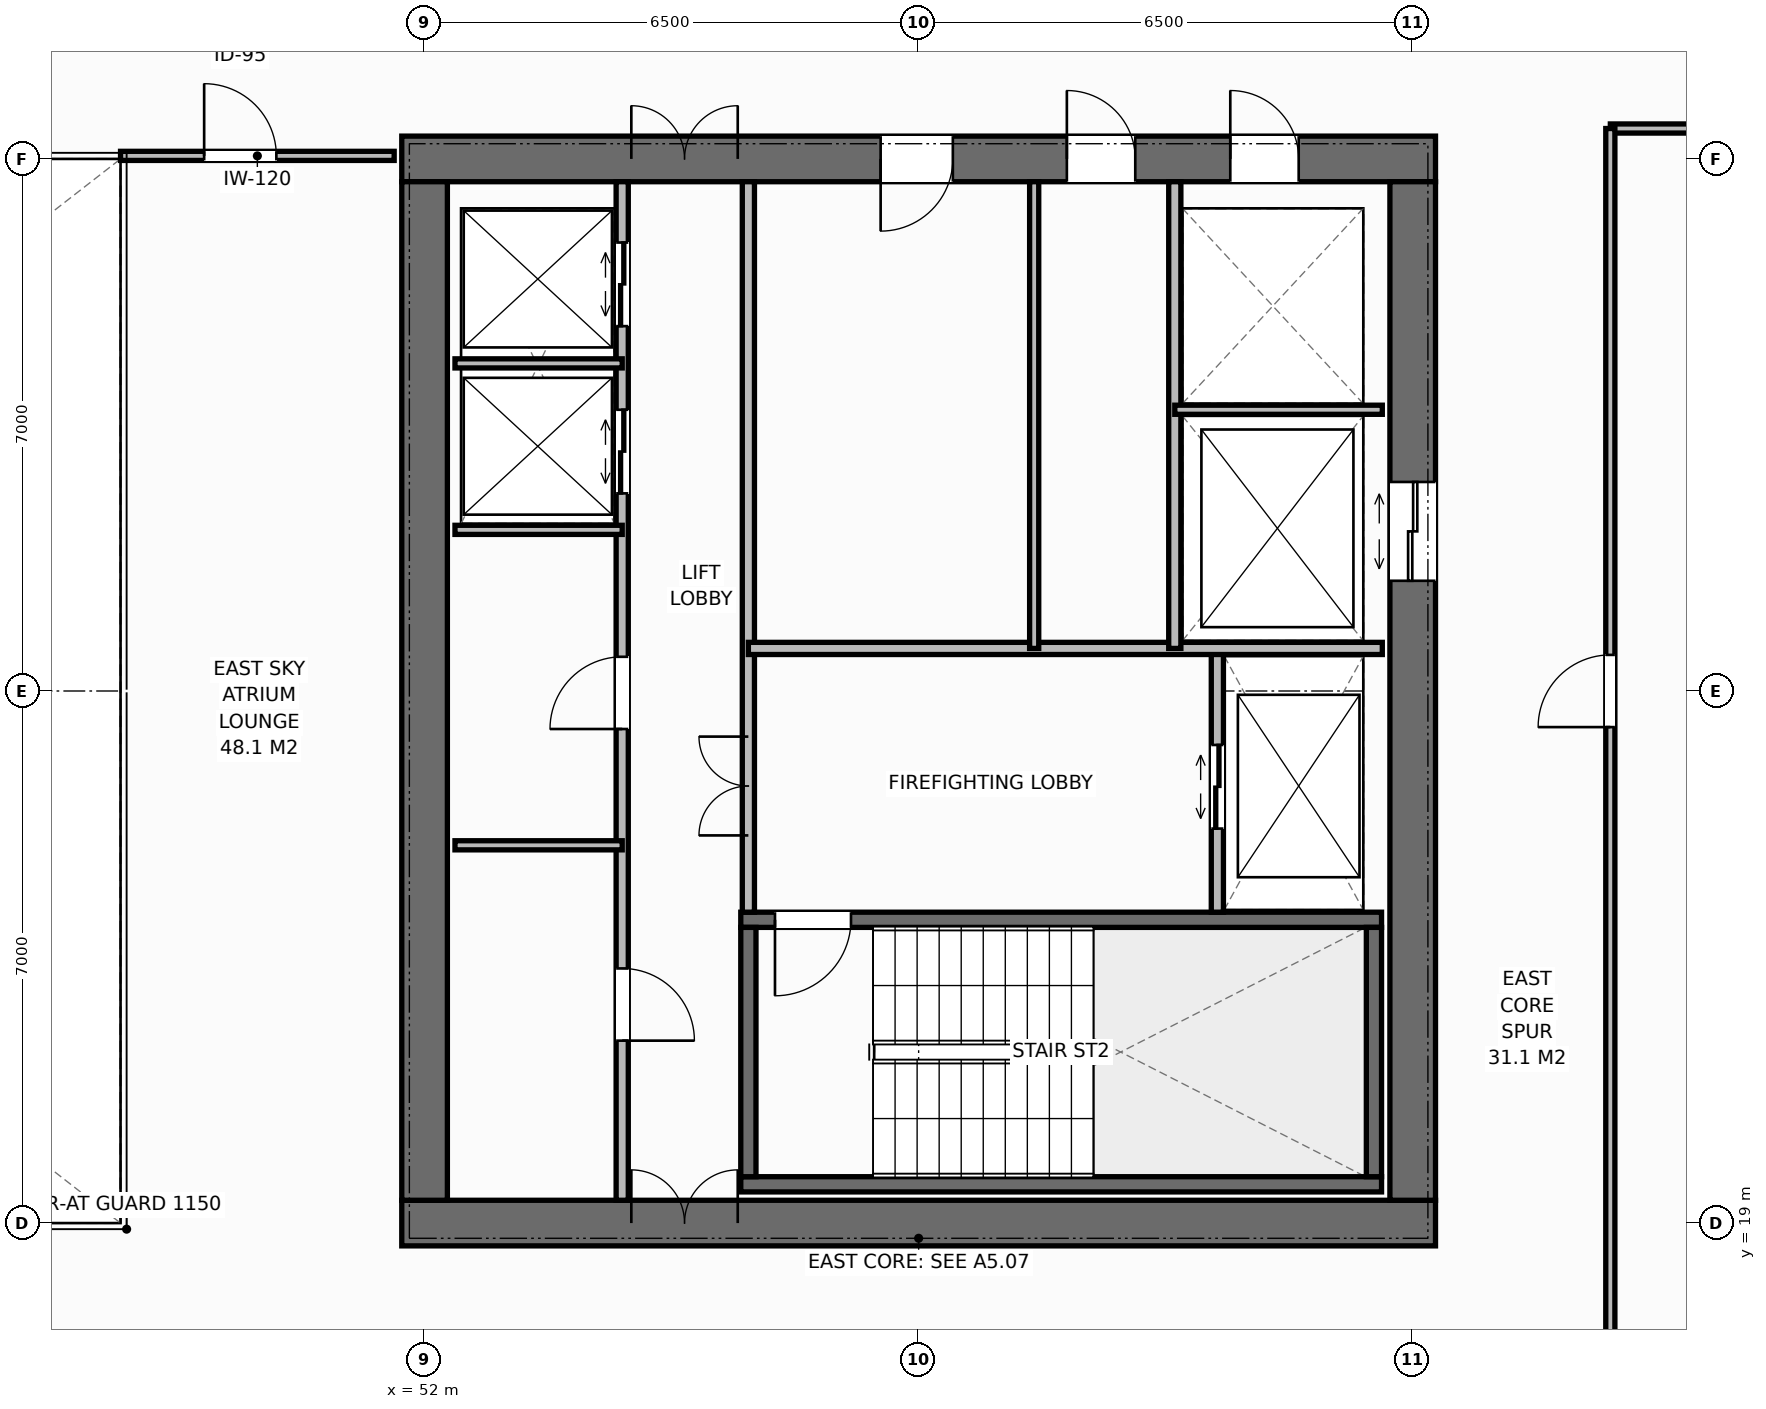
"""IFC4 building model, lengths in metres.
Left out: names, types, materials, properties, quantities, classifications, styles, units other than length and angle.
Written with IfcOpenShell. Run it as: python <this file> out.ifc"""

import sys

from ifc_helpers import new_model, si_unit, direction, frame, frame_2d, origin, place, context, subcontext, project, spatial, rectangle, extrude, element, fill, save


model = new_model("IFC4")
c1 = context("Model", 3, precision=1e-05, world=origin(), true_north=direction((0.0, 1.0)))
c2 = subcontext(c1, "Body", "Model", "MODEL_VIEW")
j1 = project(units=[si_unit("LENGTHUNIT", "METRE"), si_unit("PLANEANGLEUNIT", "RADIAN")], contexts=[c1])
p1 = place(None, origin())
s1 = spatial("IfcSite", under=j1, at=p1, CompositionType="ELEMENT")
p2 = place(p1, origin())
s2 = spatial("IfcBuilding", under=s1, at=p2, CompositionType="ELEMENT")
p3 = place(p2, frame((0.0, 0.0, 189.8)))
s3 = spatial("IfcBuildingStorey", under=s2, at=p3, CompositionType="ELEMENT", Elevation=189.8)
p4 = place(p3, frame((51.7, 19.0, 0.0), z_axis=(0.0, 0.0, 1.0), x_axis=(1.0, 0.0, 0.0)))
e1 = element("IfcWall", 1, at=p4, inside=s3, PredefinedType="SHEAR", context=c2, shape_type="SweptSolid", body=[
    extrude(rectangle(XDim=13.6, YDim=0.6, at=frame_2d((6.8, 0.0))), origin(), (0.0, 0.0, 1.0), 3.8),
])
p5 = place(p4, frame((3.02, 0.0, 0.0)))
e2 = element("IfcOpeningElement", 2, at=p5, cuts=e1, PredefinedType="OPENING", context=c2, shape_type="SweptSolid", body=[
    extrude(rectangle(XDim=1.4, YDim=2.2, at=frame_2d((0.7, 1.1))), frame((0.0, 0.31, 0.0), z_axis=(0.0, -1.0, 0.0), x_axis=(1.0, 0.0, 0.0)), (0.0, 0.0, 1.0), 0.62),
])
p6 = place(p3, frame((51.7, 33.0, 0.0), z_axis=(0.0, 0.0, 1.0), x_axis=(1.0, 0.0, 0.0)))
e3 = element("IfcWall", 3, at=p6, inside=s3, PredefinedType="SHEAR", context=c2, shape_type="SweptSolid", body=[
    extrude(rectangle(XDim=13.6, YDim=0.6, at=frame_2d((6.8, 0.0))), origin(), (0.0, 0.0, 1.0), 3.8),
])
p7 = place(p6, frame((3.02, 0.0, 0.0)))
e4 = element("IfcOpeningElement", 4, at=p7, cuts=e3, PredefinedType="OPENING", context=c2, shape_type="SweptSolid", body=[
    extrude(rectangle(XDim=1.4, YDim=2.2, at=frame_2d((0.7, 1.1))), frame((0.0, 0.31, 0.0), z_axis=(0.0, -1.0, 0.0), x_axis=(1.0, 0.0, 0.0)), (0.0, 0.0, 1.0), 0.62),
])
p8 = place(p6, frame((10.9, 0.0, 0.0)))
e5 = element("IfcOpeningElement", 5, at=p8, cuts=e3, PredefinedType="OPENING", context=c2, shape_type="SweptSolid", body=[
    extrude(rectangle(XDim=0.9, YDim=2.15, at=frame_2d((0.45, 1.075))), frame((0.0, 0.31, 0.0), z_axis=(0.0, -1.0, 0.0), x_axis=(1.0, 0.0, 0.0)), (0.0, 0.0, 1.0), 0.62),
])
p9 = place(p6, frame((6.3, 0.0, 0.0)))
e6 = element("IfcOpeningElement", 6, at=p9, cuts=e3, PredefinedType="OPENING", context=c2, shape_type="SweptSolid", body=[
    extrude(rectangle(XDim=0.95, YDim=2.15, at=frame_2d((0.475, 1.075))), frame((0.0, 0.31, 0.0), z_axis=(0.0, -1.0, 0.0), x_axis=(1.0, 0.0, 0.0)), (0.0, 0.0, 1.0), 0.62),
])
p10 = place(p6, frame((8.75, 0.0, 0.0)))
e7 = element("IfcOpeningElement", 7, at=p10, cuts=e3, PredefinedType="OPENING", context=c2, shape_type="SweptSolid", body=[
    extrude(rectangle(XDim=0.9, YDim=2.15, at=frame_2d((0.45, 1.075))), frame((0.0, 0.31, 0.0), z_axis=(0.0, -1.0, 0.0), x_axis=(1.0, 0.0, 0.0)), (0.0, 0.0, 1.0), 0.62),
])
p11 = place(p3, frame((52.0, 19.3, 0.0), z_axis=(0.0, 0.0, 1.0), x_axis=(0.0, 1.0, 0.0)))
e8 = element("IfcWall", 8, at=p11, inside=s3, PredefinedType="SHEAR", context=c2, shape_type="SweptSolid", body=[
    extrude(rectangle(XDim=13.4, YDim=0.6, at=frame_2d((6.7, 0.0))), origin(), (0.0, 0.0, 1.0), 3.8),
])
p12 = place(p3, frame((65.0, 19.3, 0.0), z_axis=(0.0, 0.0, 1.0), x_axis=(0.0, 1.0, 0.0)))
e9 = element("IfcWall", 9, at=p12, inside=s3, PredefinedType="SHEAR", context=c2, shape_type="SweptSolid", body=[
    extrude(rectangle(XDim=13.4, YDim=0.6, at=frame_2d((6.7, 0.0))), origin(), (0.0, 0.0, 1.0), 3.8),
])
p13 = place(p12, frame((8.15, 0.0, 0.0)))
e10 = element("IfcOpeningElement", 10, at=p13, cuts=e9, PredefinedType="OPENING", context=c2, shape_type="SweptSolid", body=[
    extrude(rectangle(XDim=1.3, YDim=2.2, at=frame_2d((0.65, 1.1))), frame((0.0, 0.31, 0.0), z_axis=(0.0, -1.0, 0.0), x_axis=(1.0, 0.0, 0.0)), (0.0, 0.0, 1.0), 0.62),
])
p14 = place(p3, frame((56.16, 19.51, 0.0), z_axis=(0.0, 0.0, 1.0), x_axis=(1.0, 0.0, 0.0)))
e11 = element("IfcWall", 11, at=p14, inside=s3, PredefinedType="SHEAR", context=c2, shape_type="SweptSolid", body=[
    extrude(rectangle(XDim=8.43, YDim=0.2, at=frame_2d((4.215, 0.0))), origin(), (0.0, 0.0, 1.0), 3.8),
])
p15 = place(p3, frame((56.16, 22.99, 0.0), z_axis=(0.0, 0.0, 1.0), x_axis=(1.0, 0.0, 0.0)))
e12 = element("IfcWall", 12, at=p15, inside=s3, PredefinedType="SHEAR", context=c2, shape_type="SweptSolid", body=[
    extrude(rectangle(XDim=8.43, YDim=0.2, at=frame_2d((4.215, 0.0))), origin(), (0.0, 0.0, 1.0), 3.8),
])
p16 = place(p15, frame((0.45, 0.0, 0.0)))
e13 = element("IfcOpeningElement", 13, at=p16, cuts=e12, PredefinedType="OPENING", context=c2, shape_type="SweptSolid", body=[
    extrude(rectangle(XDim=1.0, YDim=2.15, at=frame_2d((0.5, 1.075))), frame((0.0, 0.11, 0.0), z_axis=(0.0, -1.0, 0.0), x_axis=(1.0, 0.0, 0.0)), (0.0, 0.0, 1.0), 0.22),
])
for number, where, z_axis, x_axis in (
    (14, (56.26, 19.61, 0.0), (0.0, 0.0, 1.0), (0.0, 1.0, 0.0)),
    (15, (64.49, 19.61, 0.0), (0.0, 0.0, 1.0), (0.0, 1.0, 0.0)),
):
    element("IfcWall", number, at=place(p3, frame(where, z_axis=z_axis, x_axis=x_axis)), inside=s3, PredefinedType="SHEAR", context=c2, shape_type="SweptSolid", body=[
        extrude(rectangle(XDim=3.28, YDim=0.2, at=frame_2d((1.64, 0.0))), origin(), (0.0, 0.0, 1.0), 3.8),
    ])
p17 = place(p3, frame((54.6, 19.3, 0.0), z_axis=(0.0, 0.0, 1.0), x_axis=(0.0, 1.0, 0.0)))
e16 = element("IfcWall", 16, at=p17, inside=s3, PredefinedType="STANDARD", context=c2, shape_type="SweptSolid", body=[
    extrude(rectangle(XDim=13.4, YDim=0.16, at=frame_2d((6.7, 0.0))), origin(), (0.0, 0.0, 1.0), 3.572),
])
p18 = place(p17, frame((2.1, 0.0, 0.0)))
e17 = element("IfcOpeningElement", 17, at=p18, cuts=e16, PredefinedType="OPENING", context=c2, shape_type="SweptSolid", body=[
    extrude(rectangle(XDim=0.95, YDim=2.15, at=frame_2d((0.475, 1.075))), frame((0.0, 0.09, 0.0), z_axis=(0.0, -1.0, 0.0), x_axis=(1.0, 0.0, 0.0)), (0.0, 0.0, 1.0), 0.18),
])
p19 = place(p17, frame((6.2, 0.0, 0.0)))
e18 = element("IfcOpeningElement", 18, at=p19, cuts=e16, PredefinedType="OPENING", context=c2, shape_type="SweptSolid", body=[
    extrude(rectangle(XDim=0.95, YDim=2.15, at=frame_2d((0.475, 1.075))), frame((0.0, 0.09, 0.0), z_axis=(0.0, -1.0, 0.0), x_axis=(1.0, 0.0, 0.0)), (0.0, 0.0, 1.0), 0.18),
])
p20 = place(p17, frame((9.3, 0.0, 0.0)))
e19 = element("IfcOpeningElement", 19, at=p20, cuts=e16, PredefinedType="OPENING", context=c2, shape_type="SweptSolid", body=[
    extrude(rectangle(XDim=1.1, YDim=2.2, at=frame_2d((0.55, 1.1))), frame((0.0, 0.09, 0.0), z_axis=(0.0, -1.0, 0.0), x_axis=(1.0, 0.0, 0.0)), (0.0, 0.0, 1.0), 0.18),
])
p21 = place(p17, frame((11.5, 0.0, 0.0)))
e20 = element("IfcOpeningElement", 20, at=p21, cuts=e16, PredefinedType="OPENING", context=c2, shape_type="SweptSolid", body=[
    extrude(rectangle(XDim=1.1, YDim=2.2, at=frame_2d((0.55, 1.1))), frame((0.0, 0.09, 0.0), z_axis=(0.0, -1.0, 0.0), x_axis=(1.0, 0.0, 0.0)), (0.0, 0.0, 1.0), 0.18),
])
p22 = place(p3, frame((56.26, 23.09, 0.0), z_axis=(0.0, 0.0, 1.0), x_axis=(0.0, 1.0, 0.0)))
e21 = element("IfcWall", 21, at=p22, inside=s3, PredefinedType="STANDARD", context=c2, shape_type="SweptSolid", body=[
    extrude(rectangle(XDim=9.61, YDim=0.16, at=frame_2d((4.805, 0.0))), origin(), (0.0, 0.0, 1.0), 3.572),
])
p23 = place(p22, frame((1.01, 0.0, 0.0)))
e22 = element("IfcOpeningElement", 22, at=p23, cuts=e21, PredefinedType="OPENING", context=c2, shape_type="SweptSolid", body=[
    extrude(rectangle(XDim=1.3, YDim=2.2, at=frame_2d((0.65, 1.1))), frame((0.0, 0.09, 0.0), z_axis=(0.0, -1.0, 0.0), x_axis=(1.0, 0.0, 0.0)), (0.0, 0.0, 1.0), 0.18),
])
for number, where, z_axis, x_axis in (
    (23, (52.4, 23.97, 0.0), (0.0, 0.0, 1.0), (1.0, 0.0, 0.0)),
    (24, (52.4, 28.12, 0.0), (0.0, 0.0, 1.0), (1.0, 0.0, 0.0)),
    (25, (52.4, 30.31, 0.0), (0.0, 0.0, 1.0), (1.0, 0.0, 0.0)),
):
    element("IfcWall", number, at=place(p3, frame(where, z_axis=z_axis, x_axis=x_axis)), inside=s3, PredefinedType="PARTITIONING", context=c2, shape_type="SweptSolid", body=[
        extrude(rectangle(XDim=2.2, YDim=0.12, at=frame_2d((1.1, 0.0))), origin(), (0.0, 0.0, 1.0), 3.572),
    ])
p24 = place(p3, frame((62.43, 23.09, 0.0), z_axis=(0.0, 0.0, 1.0), x_axis=(0.0, 1.0, 0.0)))
e26 = element("IfcWall", 26, at=p24, inside=s3, PredefinedType="STANDARD", context=c2, shape_type="SweptSolid", body=[
    extrude(rectangle(XDim=3.47, YDim=0.16, at=frame_2d((1.735, 0.0))), origin(), (0.0, 0.0, 1.0), 3.572),
])
p25 = place(p24, frame((1.1, 0.0, 0.0)))
e27 = element("IfcOpeningElement", 27, at=p25, cuts=e26, PredefinedType="OPENING", context=c2, shape_type="SweptSolid", body=[
    extrude(rectangle(XDim=1.1, YDim=2.2, at=frame_2d((0.55, 1.1))), frame((0.0, 0.09, 0.0), z_axis=(0.0, -1.0, 0.0), x_axis=(1.0, 0.0, 0.0)), (0.0, 0.0, 1.0), 0.18),
])
p26 = place(p3, frame((56.26, 26.56, 0.0), z_axis=(0.0, 0.0, 1.0), x_axis=(1.0, 0.0, 0.0)))
e28 = element("IfcWall", 28, at=p26, inside=s3, PredefinedType="STANDARD", context=c2, shape_type="SweptSolid", body=[
    extrude(rectangle(XDim=8.34, YDim=0.16, at=frame_2d((4.17, 0.0))), origin(), (0.0, 0.0, 1.0), 3.572),
])
p27 = place(p3, frame((61.87, 26.56, 0.0), z_axis=(0.0, 0.0, 1.0), x_axis=(0.0, 1.0, 0.0)))
e29 = element("IfcWall", 29, at=p27, inside=s3, PredefinedType="STANDARD", context=c2, shape_type="SweptSolid", body=[
    extrude(rectangle(XDim=6.14, YDim=0.16, at=frame_2d((3.07, 0.0))), origin(), (0.0, 0.0, 1.0), 3.572),
])
p28 = place(p3, frame((61.87, 29.7, 0.0), z_axis=(0.0, 0.0, 1.0), x_axis=(1.0, 0.0, 0.0)))
e30 = element("IfcWall", 30, at=p28, inside=s3, PredefinedType="PARTITIONING", context=c2, shape_type="SweptSolid", body=[
    extrude(rectangle(XDim=2.73, YDim=0.12, at=frame_2d((1.365, 0.0))), origin(), (0.0, 0.0, 1.0), 3.572),
])
p29 = place(p3, frame((60.02, 26.56, 0.0), z_axis=(0.0, 0.0, 1.0), x_axis=(0.0, 1.0, 0.0)))
e31 = element("IfcWall", 31, at=p29, inside=s3, PredefinedType="PARTITIONING", context=c2, shape_type="SweptSolid", body=[
    extrude(rectangle(XDim=6.14, YDim=0.12, at=frame_2d((3.07, 0.0))), origin(), (0.0, 0.0, 1.0), 3.572),
])
p30 = place(p3, frame((48.0, 33.04, 0.0), z_axis=(0.0, 0.0, 1.0), x_axis=(1.0, 0.0, 0.0)))
e32 = element("IfcWall", 32, at=p30, inside=s3, PredefinedType="PARTITIONING", context=c2, shape_type="SweptSolid", body=[
    extrude(rectangle(XDim=3.6, YDim=0.12, at=frame_2d((1.8, 0.0))), origin(), (0.0, 0.0, 1.0), 3.312),
])
p31 = place(p30, frame((1.1, 0.0, 0.0)))
e33 = element("IfcOpeningElement", 33, at=p31, cuts=e32, PredefinedType="OPENING", context=c2, shape_type="SweptSolid", body=[
    extrude(rectangle(XDim=0.95, YDim=2.15, at=frame_2d((0.475, 1.075))), frame((0.0, 0.07, 0.0), z_axis=(0.0, -1.0, 0.0), x_axis=(1.0, 0.0, 0.0)), (0.0, 0.0, 1.0), 0.14),
])
p32 = place(p3, frame((67.6, 33.4, 0.0), z_axis=(0.0, 0.0, 1.0), x_axis=(1.0, 0.0, 0.0)))
e34 = element("IfcWall", 34, at=p32, inside=s3, PredefinedType="PARTITIONING", context=c2, shape_type="SweptSolid", body=[
    extrude(rectangle(XDim=6.58, YDim=0.12, at=frame_2d((3.29, 0.0))), origin(), (0.0, 0.0, 1.0), 3.572),
])
p33 = place(p3, frame((67.6, 16.5, 0.0), z_axis=(0.0, 0.0, 1.0), x_axis=(0.0, 1.0, 0.0)))
e35 = element("IfcWall", 35, at=p33, inside=s3, PredefinedType="PARTITIONING", context=c2, shape_type="SweptSolid", body=[
    extrude(rectangle(XDim=16.9, YDim=0.12, at=frame_2d((8.45, 0.0))), origin(), (0.0, 0.0, 1.0), 3.572),
])
p34 = place(p33, frame((9.025, 0.0, 0.0)))
e36 = element("IfcOpeningElement", 36, at=p34, cuts=e35, PredefinedType="OPENING", context=c2, shape_type="SweptSolid", body=[
    extrude(rectangle(XDim=0.95, YDim=2.15, at=frame_2d((0.475, 1.075))), frame((0.0, 0.07, 0.0), z_axis=(0.0, -1.0, 0.0), x_axis=(1.0, 0.0, 0.0)), (0.0, 0.0, 1.0), 0.14),
])
p35 = place(p5, origin())
e37 = element("IfcDoor", 37, at=p35, inside=s3, OperationType="DOUBLE_DOOR_SINGLE_SWING", PredefinedType="DOOR", context=c2, shape_type="SweptSolid", body=[
    extrude(rectangle(XDim=1.4, YDim=2.2, at=frame_2d((0.7, 1.1))), frame((0.0, 0.075, 0.0), z_axis=(0.0, -1.0, 0.0), x_axis=(1.0, 0.0, 0.0)), (0.0, 0.0, 1.0), 0.05),
])
fill(e2, e37)
p36 = place(p7, origin())
e38 = element("IfcDoor", 38, at=p36, inside=s3, OperationType="DOUBLE_DOOR_SINGLE_SWING", PredefinedType="DOOR", context=c2, shape_type="SweptSolid", body=[
    extrude(rectangle(XDim=1.4, YDim=2.2, at=frame_2d((0.7, 1.1))), frame((0.0, -0.025, 0.0), z_axis=(0.0, -1.0, 0.0), x_axis=(1.0, 0.0, 0.0)), (0.0, 0.0, 1.0), 0.05),
])
fill(e4, e38)
p37 = place(p18, origin())
e39 = element("IfcDoor", 39, at=p37, inside=s3, OperationType="SINGLE_SWING_RIGHT", PredefinedType="DOOR", context=c2, shape_type="SweptSolid", body=[
    extrude(rectangle(XDim=0.95, YDim=2.15, at=frame_2d((0.475, 1.075))), frame((0.0, 0.025, 0.0), z_axis=(0.0, -1.0, 0.0), x_axis=(1.0, 0.0, 0.0)), (0.0, 0.0, 1.0), 0.05),
])
fill(e17, e39)
p38 = place(p19, origin())
e40 = element("IfcDoor", 40, at=p38, inside=s3, OperationType="SINGLE_SWING_LEFT", PredefinedType="DOOR", context=c2, shape_type="SweptSolid", body=[
    extrude(rectangle(XDim=0.95, YDim=2.15, at=frame_2d((0.475, 1.075))), frame((0.0, 0.025, 0.0), z_axis=(0.0, -1.0, 0.0), x_axis=(1.0, 0.0, 0.0)), (0.0, 0.0, 1.0), 0.05),
])
fill(e18, e40)
p39 = place(p20, origin())
e41 = element("IfcDoor", 41, at=p39, inside=s3, OperationType="DOUBLE_DOOR_SLIDING", PredefinedType="DOOR", context=c2, shape_type="SweptSolid", body=[
    extrude(rectangle(XDim=1.1, YDim=2.2, at=frame_2d((0.55, 1.1))), frame((0.0, 0.025, 0.0), z_axis=(0.0, -1.0, 0.0), x_axis=(1.0, 0.0, 0.0)), (0.0, 0.0, 1.0), 0.05),
])
fill(e19, e41)
p40 = place(p21, origin())
e42 = element("IfcDoor", 42, at=p40, inside=s3, OperationType="DOUBLE_DOOR_SLIDING", PredefinedType="DOOR", context=c2, shape_type="SweptSolid", body=[
    extrude(rectangle(XDim=1.1, YDim=2.2, at=frame_2d((0.55, 1.1))), frame((0.0, 0.025, 0.0), z_axis=(0.0, -1.0, 0.0), x_axis=(1.0, 0.0, 0.0)), (0.0, 0.0, 1.0), 0.05),
])
fill(e20, e42)
p41 = place(p16, origin())
e43 = element("IfcDoor", 43, at=p41, inside=s3, OperationType="SINGLE_SWING_RIGHT", PredefinedType="DOOR", context=c2, shape_type="SweptSolid", body=[
    extrude(rectangle(XDim=1.0, YDim=2.15, at=frame_2d((0.5, 1.075))), frame((0.0, 0.025, 0.0), z_axis=(0.0, -1.0, 0.0), x_axis=(1.0, 0.0, 0.0)), (0.0, 0.0, 1.0), 0.05),
])
fill(e13, e43)
p42 = place(p25, origin())
e44 = element("IfcDoor", 44, at=p42, inside=s3, OperationType="DOUBLE_DOOR_SLIDING", PredefinedType="DOOR", context=c2, shape_type="SweptSolid", body=[
    extrude(rectangle(XDim=1.1, YDim=2.2, at=frame_2d((0.55, 1.1))), frame((0.0, 0.025, 0.0), z_axis=(0.0, -1.0, 0.0), x_axis=(1.0, 0.0, 0.0)), (0.0, 0.0, 1.0), 0.05),
])
fill(e27, e44)
p43 = place(p23, origin())
e45 = element("IfcDoor", 45, at=p43, inside=s3, OperationType="DOUBLE_DOOR_SINGLE_SWING", PredefinedType="DOOR", context=c2, shape_type="SweptSolid", body=[
    extrude(rectangle(XDim=1.3, YDim=2.2, at=frame_2d((0.65, 1.1))), frame((0.0, 0.025, 0.0), z_axis=(0.0, -1.0, 0.0), x_axis=(1.0, 0.0, 0.0)), (0.0, 0.0, 1.0), 0.05),
])
fill(e22, e45)
p44 = place(p13, origin())
e46 = element("IfcDoor", 46, at=p44, inside=s3, OperationType="DOUBLE_DOOR_SLIDING", PredefinedType="DOOR", context=c2, shape_type="SweptSolid", body=[
    extrude(rectangle(XDim=1.3, YDim=2.2, at=frame_2d((0.65, 1.1))), frame((0.0, 0.025, 0.0), z_axis=(0.0, -1.0, 0.0), x_axis=(1.0, 0.0, 0.0)), (0.0, 0.0, 1.0), 0.05),
])
fill(e10, e46)
p45 = place(p8, origin())
e47 = element("IfcDoor", 47, at=p45, inside=s3, OperationType="SINGLE_SWING_LEFT", PredefinedType="DOOR", context=c2, shape_type="SweptSolid", body=[
    extrude(rectangle(XDim=0.9, YDim=2.15, at=frame_2d((0.45, 1.075))), frame((0.0, -0.025, 0.0), z_axis=(0.0, -1.0, 0.0), x_axis=(1.0, 0.0, 0.0)), (0.0, 0.0, 1.0), 0.05),
])
fill(e5, e47)
p46 = place(p9, origin())
e48 = element("IfcDoor", 48, at=p46, inside=s3, OperationType="SINGLE_SWING_RIGHT", PredefinedType="DOOR", context=c2, shape_type="SweptSolid", body=[
    extrude(rectangle(XDim=0.95, YDim=2.15, at=frame_2d((0.475, 1.075))), frame((0.0, -0.025, 0.0), z_axis=(0.0, -1.0, 0.0), x_axis=(1.0, 0.0, 0.0)), (0.0, 0.0, 1.0), 0.05),
])
fill(e6, e48)
p47 = place(p10, origin())
e49 = element("IfcDoor", 49, at=p47, inside=s3, OperationType="SINGLE_SWING_LEFT", PredefinedType="DOOR", context=c2, shape_type="SweptSolid", body=[
    extrude(rectangle(XDim=0.9, YDim=2.15, at=frame_2d((0.45, 1.075))), frame((0.0, -0.025, 0.0), z_axis=(0.0, -1.0, 0.0), x_axis=(1.0, 0.0, 0.0)), (0.0, 0.0, 1.0), 0.05),
])
fill(e7, e49)
p48 = place(p31, origin())
e50 = element("IfcDoor", 50, at=p48, inside=s3, OperationType="SINGLE_SWING_LEFT", PredefinedType="DOOR", context=c2, shape_type="SweptSolid", body=[
    extrude(rectangle(XDim=0.95, YDim=2.15, at=frame_2d((0.475, 1.075))), frame((0.0, 0.025, 0.0), z_axis=(0.0, -1.0, 0.0), x_axis=(1.0, 0.0, 0.0)), (0.0, 0.0, 1.0), 0.05),
])
fill(e33, e50)
p49 = place(p34, origin())
e51 = element("IfcDoor", 51, at=p49, inside=s3, OperationType="SINGLE_SWING_LEFT", PredefinedType="DOOR", context=c2, shape_type="SweptSolid", body=[
    extrude(rectangle(XDim=0.95, YDim=2.15, at=frame_2d((0.475, 1.075))), frame((0.0, 0.025, 0.0), z_axis=(0.0, -1.0, 0.0), x_axis=(1.0, 0.0, 0.0)), (0.0, 0.0, 1.0), 0.05),
])
fill(e36, e51)
save(model, sys.argv[1])
